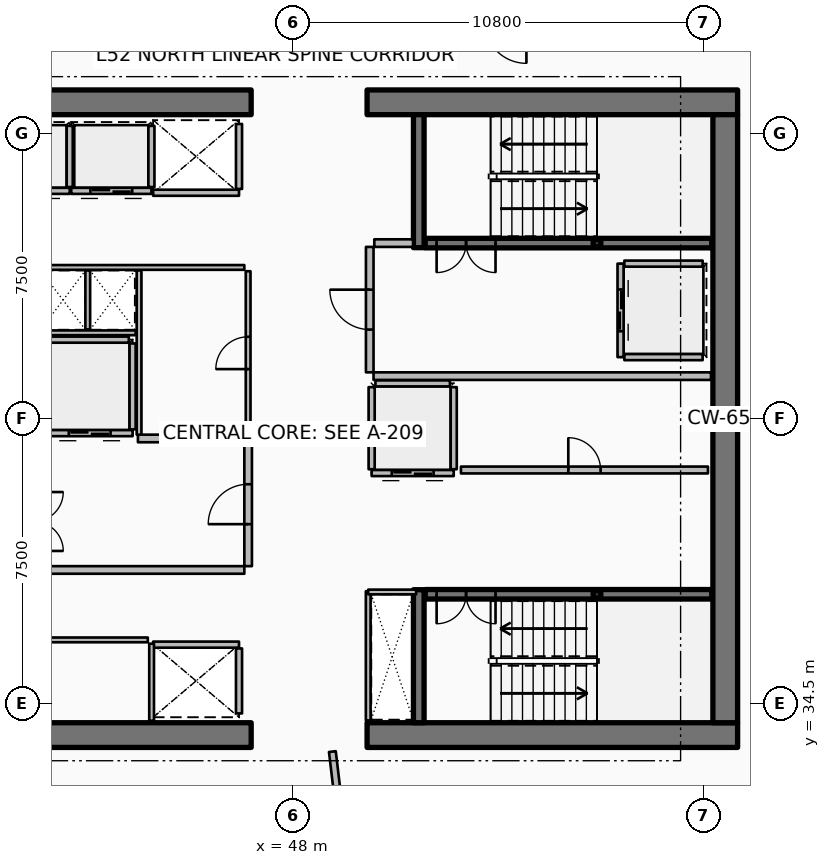
"""IFC4 building model, lengths in metres.
Left out: names, types, materials, properties, quantities, classifications, styles, units other than length and angle.
Written with IfcOpenShell. Run it as: python <this file> out.ifc"""

import sys

from ifc_helpers import new_model, si_unit, direction, frame, frame_2d, origin, origin_2d, place, context, subcontext, project, spatial, rectangle, hollow_rectangle, extrude, element, fill, save


model = new_model("IFC4")
c1 = context("Model", 3, precision=1e-05, world=origin(), true_north=direction((0.0, 1.0)))
c2 = subcontext(c1, "Body", "Model", "MODEL_VIEW")
j1 = project(units=[si_unit("LENGTHUNIT", "METRE"), si_unit("PLANEANGLEUNIT", "RADIAN")], contexts=[c1])
p1 = place(None, origin())
s1 = spatial("IfcSite", under=j1, at=p1, CompositionType="ELEMENT")
p2 = place(p1, origin())
s2 = spatial("IfcBuilding", under=s1, at=p2, CompositionType="ELEMENT")
p3 = place(p2, frame((0.0, 0.0, 206.55)))
s3 = spatial("IfcBuildingStorey", under=s2, at=p3, CompositionType="ELEMENT", Elevation=206.55)
for number, where, z_axis, x_axis in (
    (1, (37.15, 33.675, 0.0), (0.0, 0.0, 1.0), (1.0, 0.0, 0.0)),
    (2, (49.95, 33.675, 0.0), (0.0, 0.0, 1.0), (1.0, 0.0, 0.0)),
    (3, (37.15, 50.325, 0.0), (0.0, 0.0, 1.0), (1.0, 0.0, 0.0)),
    (4, (49.95, 50.325, 0.0), (0.0, 0.0, 1.0), (1.0, 0.0, 0.0)),
):
    element("IfcWall", number, at=place(p3, frame(where, z_axis=z_axis, x_axis=x_axis)), inside=s3, PredefinedType="SHEAR", context=c2, shape_type="SweptSolid", body=[
        extrude(rectangle(XDim=9.75, YDim=0.65, at=frame_2d((4.875, 0.0))), origin(), (0.0, 0.0, 1.0), 3.75),
    ])
p4 = place(p3, frame((59.375, 34.0, 0.0), z_axis=(0.0, 0.0, 1.0), x_axis=(0.0, 1.0, 0.0)))
e5 = element("IfcWall", 5, at=p4, inside=s3, PredefinedType="SHEAR", context=c2, shape_type="SweptSolid", body=[
    extrude(rectangle(XDim=16.0, YDim=0.65, at=frame_2d((8.0, 0.0))), origin(), (0.0, 0.0, 1.0), 3.75),
])
for number, where, z_axis, x_axis in (
    (6, (51.31, 46.5, 0.0), (0.0, 0.0, 1.0), (0.0, 1.0, 0.0)),
    (7, (51.31, 34.0, 0.0), (0.0, 0.0, 1.0), (0.0, 1.0, 0.0)),
):
    element("IfcWall", number, at=place(p3, frame(where, z_axis=z_axis, x_axis=x_axis)), inside=s3, PredefinedType="SHEAR", context=c2, shape_type="SweptSolid", body=[
        extrude(rectangle(XDim=3.5, YDim=0.28, at=frame_2d((1.75, 0.0))), origin(), (0.0, 0.0, 1.0), 3.75),
    ])
for number, where, z_axis, x_axis in (
    (8, (56.0, 46.62, 0.0), (0.0, 0.0, 1.0), (1.0, 0.0, 0.0)),
    (9, (56.0, 37.38, 0.0), (0.0, 0.0, 1.0), (1.0, 0.0, 0.0)),
):
    element("IfcColumn", number, at=place(p3, frame(where, z_axis=z_axis, x_axis=x_axis)), inside=s3, PredefinedType="COLUMN", context=c2, shape_type="SweptSolid", body=[
        extrude(hollow_rectangle(XDim=0.2, YDim=0.2, WallThickness=0.01, InnerFilletRadius=0.01, OuterFilletRadius=0.02, at=origin_2d()), origin(), (0.0, 0.0, 1.0), 1.67),
    ])
p5 = place(p3, frame((51.48, 46.62, 0.0), z_axis=(0.0, 0.0, 1.0), x_axis=(1.0, 0.0, 0.0)))
e10 = element("IfcWall", 10, at=p5, inside=s3, PredefinedType="SOLIDWALL", context=c2, shape_type="SweptSolid", body=[
    extrude(rectangle(XDim=7.54, YDim=0.25, at=frame_2d((3.77, 0.0))), origin(), (0.0, 0.0, 1.0), 3.5),
])
p6 = place(p5, frame((0.3, 0.0, 0.0)))
e11 = element("IfcOpeningElement", 11, at=p6, cuts=e10, PredefinedType="OPENING", context=c2, shape_type="SweptSolid", body=[
    extrude(rectangle(XDim=1.55, YDim=2.15, at=frame_2d((0.775, 1.075))), frame((0.0, 0.135, 0.0), z_axis=(0.0, -1.0, 0.0), x_axis=(1.0, 0.0, 0.0)), (0.0, 0.0, 1.0), 0.27),
])
p7 = place(p3, frame((51.48, 37.38, 0.0), z_axis=(0.0, 0.0, 1.0), x_axis=(1.0, 0.0, 0.0)))
e12 = element("IfcWall", 12, at=p7, inside=s3, PredefinedType="SOLIDWALL", context=c2, shape_type="SweptSolid", body=[
    extrude(rectangle(XDim=7.54, YDim=0.25, at=frame_2d((3.77, 0.0))), origin(), (0.0, 0.0, 1.0), 3.5),
])
p8 = place(p7, frame((0.3, 0.0, 0.0)))
e13 = element("IfcOpeningElement", 13, at=p8, cuts=e12, PredefinedType="OPENING", context=c2, shape_type="SweptSolid", body=[
    extrude(rectangle(XDim=1.55, YDim=2.15, at=frame_2d((0.775, 1.075))), frame((0.0, 0.135, 0.0), z_axis=(0.0, -1.0, 0.0), x_axis=(1.0, 0.0, 0.0)), (0.0, 0.0, 1.0), 0.27),
])
p9 = place(p3, frame((42.125, 47.995, 0.0), z_axis=(0.0, 0.0, 1.0), x_axis=(-1.0, 0.0, 0.0)))
e14 = element("IfcWall", 14, at=p9, inside=s3, PredefinedType="PARTITIONING", context=c2, shape_type="SweptSolid", body=[
    extrude(rectangle(XDim=2.11, YDim=0.16, at=frame_2d((1.055, 0.0))), origin(), (0.0, 0.0, 1.0), 3.5),
])
p10 = place(p9, frame((0.505, 0.0, 0.0)))
e15 = element("IfcOpeningElement", 15, at=p10, cuts=e14, PredefinedType="OPENING", context=c2, shape_type="SweptSolid", body=[
    extrude(rectangle(XDim=1.1, YDim=2.1, at=frame_2d((0.55, 1.05))), frame((0.0, 0.09, 0.0), z_axis=(0.0, -1.0, 0.0), x_axis=(1.0, 0.0, 0.0)), (0.0, 0.0, 1.0), 0.18),
])
p11 = place(p3, frame((42.125, 48.095, 0.0), z_axis=(0.0, 0.0, 1.0), x_axis=(0.0, 1.0, 0.0)))
e16 = element("IfcWall", 16, at=p11, inside=s3, PredefinedType="PARTITIONING", context=c2, shape_type="SweptSolid", body=[
    extrude(rectangle(XDim=1.61, YDim=0.16, at=frame_2d((0.805, 0.0))), origin(), (0.0, 0.0, 1.0), 3.5),
])
p12 = place(p3, frame((44.275, 47.995, 0.0), z_axis=(0.0, 0.0, 1.0), x_axis=(-1.0, 0.0, 0.0)))
e17 = element("IfcWall", 17, at=p12, inside=s3, PredefinedType="PARTITIONING", context=c2, shape_type="SweptSolid", body=[
    extrude(rectangle(XDim=2.11, YDim=0.16, at=frame_2d((1.055, 0.0))), origin(), (0.0, 0.0, 1.0), 3.5),
])
p13 = place(p12, frame((0.505, 0.0, 0.0)))
e18 = element("IfcOpeningElement", 18, at=p13, cuts=e17, PredefinedType="OPENING", context=c2, shape_type="SweptSolid", body=[
    extrude(rectangle(XDim=1.1, YDim=2.1, at=frame_2d((0.55, 1.05))), frame((0.0, 0.09, 0.0), z_axis=(0.0, -1.0, 0.0), x_axis=(1.0, 0.0, 0.0)), (0.0, 0.0, 1.0), 0.18),
])
p14 = place(p3, frame((44.275, 48.095, 0.0), z_axis=(0.0, 0.0, 1.0), x_axis=(0.0, 1.0, 0.0)))
e19 = element("IfcWall", 19, at=p14, inside=s3, PredefinedType="PARTITIONING", context=c2, shape_type="SweptSolid", body=[
    extrude(rectangle(XDim=1.61, YDim=0.16, at=frame_2d((0.805, 0.0))), origin(), (0.0, 0.0, 1.0), 3.5),
])
p15 = place(p3, frame((46.58, 47.945, 0.0), z_axis=(0.0, 0.0, 1.0), x_axis=(-1.0, 0.0, 0.0)))
e20 = element("IfcWall", 20, at=p15, inside=s3, PredefinedType="PARTITIONING", context=c2, shape_type="SweptSolid", body=[
    extrude(rectangle(XDim=2.26, YDim=0.16, at=frame_2d((1.13, 0.0))), origin(), (0.0, 0.0, 1.0), 3.5),
])
p16 = place(p3, frame((46.58, 48.045, 0.0), z_axis=(0.0, 0.0, 1.0), x_axis=(0.0, 1.0, 0.0)))
e21 = element("IfcWall", 21, at=p16, inside=s3, PredefinedType="PARTITIONING", context=c2, shape_type="SweptSolid", body=[
    extrude(rectangle(XDim=1.71, YDim=0.16, at=frame_2d((0.855, 0.0))), origin(), (0.0, 0.0, 1.0), 3.5),
])
p17 = place(p3, frame((44.32, 36.055, 0.0), z_axis=(0.0, 0.0, 1.0), x_axis=(1.0, 0.0, 0.0)))
e22 = element("IfcWall", 22, at=p17, inside=s3, PredefinedType="PARTITIONING", context=c2, shape_type="SweptSolid", body=[
    extrude(rectangle(XDim=2.26, YDim=0.16, at=frame_2d((1.13, 0.0))), origin(), (0.0, 0.0, 1.0), 3.5),
])
p18 = place(p3, frame((46.58, 34.245, 0.0), z_axis=(0.0, 0.0, 1.0), x_axis=(0.0, 1.0, 0.0)))
e23 = element("IfcWall", 23, at=p18, inside=s3, PredefinedType="PARTITIONING", context=c2, shape_type="SweptSolid", body=[
    extrude(rectangle(XDim=1.71, YDim=0.16, at=frame_2d((0.855, 0.0))), origin(), (0.0, 0.0, 1.0), 3.5),
])
p19 = place(p3, frame((43.78, 41.62, 0.0), z_axis=(0.0, 0.0, 1.0), x_axis=(-1.0, 0.0, 0.0)))
e24 = element("IfcWall", 24, at=p19, inside=s3, PredefinedType="PARTITIONING", context=c2, shape_type="SweptSolid", body=[
    extrude(rectangle(XDim=2.26, YDim=0.16, at=frame_2d((1.13, 0.0))), origin(), (0.0, 0.0, 1.0), 3.5),
])
p20 = place(p19, frame((0.58, 0.0, 0.0)))
e25 = element("IfcOpeningElement", 25, at=p20, cuts=e24, PredefinedType="OPENING", context=c2, shape_type="SweptSolid", body=[
    extrude(rectangle(XDim=1.1, YDim=2.1, at=frame_2d((0.55, 1.05))), frame((0.0, 0.09, 0.0), z_axis=(0.0, -1.0, 0.0), x_axis=(1.0, 0.0, 0.0)), (0.0, 0.0, 1.0), 0.18),
])
p21 = place(p3, frame((43.78, 41.72, 0.0), z_axis=(0.0, 0.0, 1.0), x_axis=(0.0, 1.0, 0.0)))
e26 = element("IfcWall", 26, at=p21, inside=s3, PredefinedType="PARTITIONING", context=c2, shape_type="SweptSolid", body=[
    extrude(rectangle(XDim=2.26, YDim=0.16, at=frame_2d((1.13, 0.0))), origin(), (0.0, 0.0, 1.0), 3.5),
])
p22 = place(p3, frame((41.62, 44.08, 0.0), z_axis=(0.0, 0.0, 1.0), x_axis=(1.0, 0.0, 0.0)))
e27 = element("IfcWall", 27, at=p22, inside=s3, PredefinedType="PARTITIONING", context=c2, shape_type="SweptSolid", body=[
    extrude(rectangle(XDim=2.06, YDim=0.16, at=frame_2d((1.03, 0.0))), origin(), (0.0, 0.0, 1.0), 3.5),
])
p23 = place(p3, frame((56.62, 46.08, 0.0), z_axis=(0.0, 0.0, 1.0), x_axis=(0.0, -1.0, 0.0)))
e28 = element("IfcWall", 28, at=p23, inside=s3, PredefinedType="PARTITIONING", context=c2, shape_type="SweptSolid", body=[
    extrude(rectangle(XDim=2.46, YDim=0.16, at=frame_2d((1.23, 0.0))), origin(), (0.0, 0.0, 1.0), 3.5),
])
p24 = place(p23, frame((0.68, 0.0, 0.0)))
e29 = element("IfcOpeningElement", 29, at=p24, cuts=e28, PredefinedType="OPENING", context=c2, shape_type="SweptSolid", body=[
    extrude(rectangle(XDim=1.1, YDim=2.1, at=frame_2d((0.55, 1.05))), frame((0.0, 0.09, 0.0), z_axis=(0.0, -1.0, 0.0), x_axis=(1.0, 0.0, 0.0)), (0.0, 0.0, 1.0), 0.18),
])
for number, where, z_axis, x_axis in (
    (30, (56.72, 46.08, 0.0), (0.0, 0.0, 1.0), (1.0, 0.0, 0.0)),
    (31, (56.72, 43.62, 0.0), (0.0, 0.0, 1.0), (1.0, 0.0, 0.0)),
):
    element("IfcWall", number, at=place(p3, frame(where, z_axis=z_axis, x_axis=x_axis)), inside=s3, PredefinedType="PARTITIONING", context=c2, shape_type="SweptSolid", body=[
        extrude(rectangle(XDim=2.06, YDim=0.16, at=frame_2d((1.03, 0.0))), origin(), (0.0, 0.0, 1.0), 3.5),
    ])
p25 = place(p3, frame((52.23, 40.57, 0.0), z_axis=(0.0, 0.0, 1.0), x_axis=(-1.0, 0.0, 0.0)))
e32 = element("IfcWall", 32, at=p25, inside=s3, PredefinedType="PARTITIONING", context=c2, shape_type="SweptSolid", body=[
    extrude(rectangle(XDim=2.16, YDim=0.16, at=frame_2d((1.08, 0.0))), origin(), (0.0, 0.0, 1.0), 3.5),
])
p26 = place(p25, frame((0.53, 0.0, 0.0)))
e33 = element("IfcOpeningElement", 33, at=p26, cuts=e32, PredefinedType="OPENING", context=c2, shape_type="SweptSolid", body=[
    extrude(rectangle(XDim=1.1, YDim=2.1, at=frame_2d((0.55, 1.05))), frame((0.0, 0.09, 0.0), z_axis=(0.0, -1.0, 0.0), x_axis=(1.0, 0.0, 0.0)), (0.0, 0.0, 1.0), 0.18),
])
for number, where, z_axis, x_axis in (
    (34, (52.23, 40.67, 0.0), (0.0, 0.0, 1.0), (0.0, 1.0, 0.0)),
    (35, (50.07, 40.67, 0.0), (0.0, 0.0, 1.0), (0.0, 1.0, 0.0)),
):
    element("IfcWall", number, at=place(p3, frame(where, z_axis=z_axis, x_axis=x_axis)), inside=s3, PredefinedType="PARTITIONING", context=c2, shape_type="SweptSolid", body=[
        extrude(rectangle(XDim=2.16, YDim=0.16, at=frame_2d((1.08, 0.0))), origin(), (0.0, 0.0, 1.0), 3.5),
    ])
p27 = place(p3, frame((50.17, 42.93, 0.0), z_axis=(0.0, 0.0, 1.0), x_axis=(1.0, 0.0, 0.0)))
e36 = element("IfcWall", 36, at=p27, inside=s3, PredefinedType="PARTITIONING", context=c2, shape_type="SweptSolid", body=[
    extrude(rectangle(XDim=1.96, YDim=0.16, at=frame_2d((0.98, 0.0))), origin(), (0.0, 0.0, 1.0), 3.5),
])
p28 = place(p3, frame((52.42, 40.65, 0.0), z_axis=(0.0, 0.0, 1.0), x_axis=(1.0, 0.0, 0.0)))
e37 = element("IfcWall", 37, at=p28, inside=s3, PredefinedType="PARTITIONING", context=c2, shape_type="SweptSolid", body=[
    extrude(rectangle(XDim=6.5, YDim=0.18, at=frame_2d((3.25, 0.0))), origin(), (0.0, 0.0, 1.0), 3.5),
])
p29 = place(p28, frame((2.825, 0.0, 0.0)))
e38 = element("IfcOpeningElement", 38, at=p29, cuts=e37, PredefinedType="OPENING", context=c2, shape_type="SweptSolid", body=[
    extrude(rectangle(XDim=0.85, YDim=2.06, at=frame_2d((0.425, 1.03))), frame((0.0, 0.1, 0.0), z_axis=(0.0, -1.0, 0.0), x_axis=(1.0, 0.0, 0.0)), (0.0, 0.0, 1.0), 0.2),
])
p30 = place(p3, frame((44.28, 34.05, 0.0), z_axis=(0.0, 0.0, 1.0), x_axis=(0.0, 1.0, 0.0)))
e39 = element("IfcWall", 39, at=p30, inside=s3, PredefinedType="PARTITIONING", context=c2, shape_type="SweptSolid", body=[
    extrude(rectangle(XDim=2.03, YDim=0.125, at=frame_2d((1.015, 0.0))), origin(), (0.0, 0.0, 1.0), 2.94),
])
p31 = place(p3, frame((37.92, 36.18, 0.0), z_axis=(0.0, 0.0, 1.0), x_axis=(1.0, 0.0, 0.0)))
e40 = element("IfcWall", 40, at=p31, inside=s3, PredefinedType="PARTITIONING", context=c2, shape_type="SweptSolid", body=[
    extrude(rectangle(XDim=6.26, YDim=0.125, at=frame_2d((3.13, 0.0))), origin(), (0.0, 0.0, 1.0), 2.94),
])
p32 = place(p31, frame((2.705, 0.0, 0.0)))
e41 = element("IfcOpeningElement", 41, at=p32, cuts=e40, PredefinedType="OPENING", context=c2, shape_type="SweptSolid", body=[
    extrude(rectangle(XDim=0.85, YDim=2.06, at=frame_2d((0.425, 1.03))), frame((0.0, 0.073, 0.0), z_axis=(0.0, -1.0, 0.0), x_axis=(1.0, 0.0, 0.0)), (0.0, 0.0, 1.0), 0.145),
])
p33 = place(p3, frame((41.35, 38.02, 0.0), z_axis=(0.0, 0.0, 1.0), x_axis=(1.0, 0.0, 0.0)))
e42 = element("IfcWall", 42, at=p33, inside=s3, PredefinedType="PARTITIONING", context=c2, shape_type="SweptSolid", body=[
    extrude(rectangle(XDim=5.37, YDim=0.2, at=frame_2d((2.685, 0.0))), origin(), (0.0, 0.0, 1.0), 3.5),
])
p34 = place(p3, frame((43.92, 41.48, 0.0), z_axis=(0.0, 0.0, 1.0), x_axis=(1.0, 0.0, 0.0)))
e43 = element("IfcWall", 43, at=p34, inside=s3, PredefinedType="PARTITIONING", context=c2, shape_type="SweptSolid", body=[
    extrude(rectangle(XDim=2.8, YDim=0.2, at=frame_2d((1.4, 0.0))), origin(), (0.0, 0.0, 1.0), 3.5),
])
p35 = place(p3, frame((46.82, 38.12, 0.0), z_axis=(0.0, 0.0, 1.0), x_axis=(0.0, 1.0, 0.0)))
e44 = element("IfcWall", 44, at=p35, inside=s3, PredefinedType="PARTITIONING", context=c2, shape_type="SweptSolid", body=[
    extrude(rectangle(XDim=3.26, YDim=0.2, at=frame_2d((1.63, 0.0))), origin(), (0.0, 0.0, 1.0), 3.5),
])
p36 = place(p35, frame((1.105, 0.0, 0.0)))
e45 = element("IfcOpeningElement", 45, at=p36, cuts=e44, PredefinedType="OPENING", context=c2, shape_type="SweptSolid", body=[
    extrude(rectangle(XDim=1.05, YDim=2.1, at=frame_2d((0.525, 1.05))), frame((0.0, 0.11, 0.0), z_axis=(0.0, -1.0, 0.0), x_axis=(1.0, 0.0, 0.0)), (0.0, 0.0, 1.0), 0.22),
])
p37 = place(p3, frame((50.12, 43.12, 0.0), z_axis=(0.0, 0.0, 1.0), x_axis=(1.0, 0.0, 0.0)))
e46 = element("IfcWall", 46, at=p37, inside=s3, PredefinedType="PARTITIONING", context=c2, shape_type="SweptSolid", body=[
    extrude(rectangle(XDim=8.88, YDim=0.2, at=frame_2d((4.44, 0.0))), origin(), (0.0, 0.0, 1.0), 3.5),
])
p38 = place(p3, frame((50.14, 46.62, 0.0), z_axis=(0.0, 0.0, 1.0), x_axis=(1.0, 0.0, 0.0)))
e47 = element("IfcWall", 47, at=p38, inside=s3, PredefinedType="PARTITIONING", context=c2, shape_type="SweptSolid", body=[
    extrude(rectangle(XDim=1.02, YDim=0.2, at=frame_2d((0.51, 0.0))), origin(), (0.0, 0.0, 1.0), 3.5),
])
p39 = place(p3, frame((50.02, 43.22, 0.0), z_axis=(0.0, 0.0, 1.0), x_axis=(0.0, 1.0, 0.0)))
e48 = element("IfcWall", 48, at=p39, inside=s3, PredefinedType="PARTITIONING", context=c2, shape_type="SweptSolid", body=[
    extrude(rectangle(XDim=3.3, YDim=0.2, at=frame_2d((1.65, 0.0))), origin(), (0.0, 0.0, 1.0), 3.5),
])
p40 = place(p39, frame((1.125, 0.0, 0.0)))
e49 = element("IfcOpeningElement", 49, at=p40, cuts=e48, PredefinedType="OPENING", context=c2, shape_type="SweptSolid", body=[
    extrude(rectangle(XDim=1.05, YDim=2.1, at=frame_2d((0.525, 1.05))), frame((0.0, 0.11, 0.0), z_axis=(0.0, -1.0, 0.0), x_axis=(1.0, 0.0, 0.0)), (0.0, 0.0, 1.0), 0.22),
])
p41 = place(p3, frame((41.36, 45.98, 0.0), z_axis=(0.0, 0.0, 1.0), x_axis=(1.0, 0.0, 0.0)))
e50 = element("IfcWall", 50, at=p41, inside=s3, PredefinedType="PARTITIONING", context=c2, shape_type="SweptSolid", body=[
    extrude(rectangle(XDim=5.36, YDim=0.125, at=frame_2d((2.68, 0.0))), origin(), (0.0, 0.0, 1.0), 2.94),
])
p42 = place(p3, frame((41.36, 44.26, 0.0), z_axis=(0.0, 0.0, 1.0), x_axis=(1.0, 0.0, 0.0)))
e51 = element("IfcWall", 51, at=p42, inside=s3, PredefinedType="PARTITIONING", context=c2, shape_type="SweptSolid", body=[
    extrude(rectangle(XDim=2.5, YDim=0.125, at=frame_2d((1.25, 0.0))), origin(), (0.0, 0.0, 1.0), 2.94),
])
p43 = place(p3, frame((42.6, 44.35, 0.0), z_axis=(0.0, 0.0, 1.0), x_axis=(0.0, 1.0, 0.0)))
e52 = element("IfcWall", 52, at=p43, inside=s3, PredefinedType="PARTITIONING", context=c2, shape_type="SweptSolid", body=[
    extrude(rectangle(XDim=1.55, YDim=0.125, at=frame_2d((0.775, 0.0))), origin(), (0.0, 0.0, 1.0), 2.94),
])
p44 = place(p3, frame((49.98, 34.06, 0.0), z_axis=(0.0, 0.0, 1.0), x_axis=(0.0, 1.0, 0.0)))
e53 = element("IfcWall", 53, at=p44, inside=s3, PredefinedType="PARTITIONING", context=c2, shape_type="SweptSolid", body=[
    extrude(rectangle(XDim=3.4, YDim=0.125, at=frame_2d((1.7, 0.0))), origin(), (0.0, 0.0, 1.0), 2.94),
])
p45 = place(p3, frame((49.98, 37.44, 0.0), z_axis=(0.0, 0.0, 1.0), x_axis=(1.0, 0.0, 0.0)))
e54 = element("IfcWall", 54, at=p45, inside=s3, PredefinedType="PARTITIONING", context=c2, shape_type="SweptSolid", body=[
    extrude(rectangle(XDim=1.26, YDim=0.125, at=frame_2d((0.63, 0.0))), origin(), (0.0, 0.0, 1.0), 2.94),
])
p46 = place(p3, frame((43.95, 41.58, 0.0), z_axis=(0.0, 0.0, 1.0), x_axis=(0.0, 1.0, 0.0)))
e55 = element("IfcWall", 55, at=p46, inside=s3, PredefinedType="PARTITIONING", context=c2, shape_type="SweptSolid", body=[
    extrude(rectangle(XDim=4.32, YDim=0.125, at=frame_2d((2.16, 0.0))), origin(), (0.0, 0.0, 1.0), 2.94),
])
p47 = place(p3, frame((46.82, 41.58, 0.0), z_axis=(0.0, 0.0, 1.0), x_axis=(0.0, 1.0, 0.0)))
e56 = element("IfcWall", 56, at=p47, inside=s3, PredefinedType="PARTITIONING", context=c2, shape_type="SweptSolid", body=[
    extrude(rectangle(XDim=4.3, YDim=0.125, at=frame_2d((2.15, 0.0))), origin(), (0.0, 0.0, 1.0), 2.94),
])
p48 = place(p47, frame((1.725, 0.0, 0.0)))
e57 = element("IfcOpeningElement", 57, at=p48, cuts=e56, PredefinedType="OPENING", context=c2, shape_type="SweptSolid", body=[
    extrude(rectangle(XDim=0.85, YDim=2.06, at=frame_2d((0.425, 1.03))), frame((0.0, 0.073, 0.0), z_axis=(0.0, -1.0, 0.0), x_axis=(1.0, 0.0, 0.0)), (0.0, 0.0, 1.0), 0.145),
])
p49 = place(p3, frame((49.037, 33.241, 0.0), z_axis=(0.0, 0.0, 1.0), x_axis=(0.11753742895, -0.993068453228, 0.0)))
e58 = element("IfcWall", 58, at=p49, inside=s3, PredefinedType="PARTITIONING", context=c2, shape_type="SweptSolid", body=[
    extrude(rectangle(XDim=13.815, YDim=0.18, at=frame_2d((6.907, 0.0))), origin(), (0.0, 0.0, 1.0), 2.94),
])
p50 = place(p6, origin())
e59 = element("IfcDoor", 59, at=p50, inside=s3, OperationType="DOUBLE_DOOR_SINGLE_SWING", PredefinedType="DOOR", context=c2, shape_type="SweptSolid", body=[
    extrude(rectangle(XDim=1.55, YDim=2.15, at=frame_2d((0.775, 1.075))), frame((0.0, 0.025, 0.0), z_axis=(0.0, -1.0, 0.0), x_axis=(1.0, 0.0, 0.0)), (0.0, 0.0, 1.0), 0.05),
])
fill(e11, e59)
p51 = place(p8, origin())
e60 = element("IfcDoor", 60, at=p51, inside=s3, OperationType="DOUBLE_DOOR_SINGLE_SWING", PredefinedType="DOOR", context=c2, shape_type="SweptSolid", body=[
    extrude(rectangle(XDim=1.55, YDim=2.15, at=frame_2d((0.775, 1.075))), frame((0.0, 0.025, 0.0), z_axis=(0.0, -1.0, 0.0), x_axis=(1.0, 0.0, 0.0)), (0.0, 0.0, 1.0), 0.05),
])
fill(e13, e60)
p52 = place(p13, origin())
e61 = element("IfcDoor", 61, at=p52, inside=s3, OperationType="DOUBLE_DOOR_SLIDING", PredefinedType="DOOR", context=c2, shape_type="SweptSolid", body=[
    extrude(rectangle(XDim=1.1, YDim=2.1, at=frame_2d((0.55, 1.05))), frame((0.0, 0.025, 0.0), z_axis=(0.0, -1.0, 0.0), x_axis=(1.0, 0.0, 0.0)), (0.0, 0.0, 1.0), 0.05),
])
fill(e18, e61)
p53 = place(p20, origin())
e62 = element("IfcDoor", 62, at=p53, inside=s3, OperationType="DOUBLE_DOOR_SLIDING", PredefinedType="DOOR", context=c2, shape_type="SweptSolid", body=[
    extrude(rectangle(XDim=1.1, YDim=2.1, at=frame_2d((0.55, 1.05))), frame((0.0, 0.025, 0.0), z_axis=(0.0, -1.0, 0.0), x_axis=(1.0, 0.0, 0.0)), (0.0, 0.0, 1.0), 0.05),
])
fill(e25, e62)
p54 = place(p24, origin())
e63 = element("IfcDoor", 63, at=p54, inside=s3, OperationType="DOUBLE_DOOR_SLIDING", PredefinedType="DOOR", context=c2, shape_type="SweptSolid", body=[
    extrude(rectangle(XDim=1.1, YDim=2.1, at=frame_2d((0.55, 1.05))), frame((0.0, 0.025, 0.0), z_axis=(0.0, -1.0, 0.0), x_axis=(1.0, 0.0, 0.0)), (0.0, 0.0, 1.0), 0.05),
])
fill(e29, e63)
p55 = place(p26, origin())
e64 = element("IfcDoor", 64, at=p55, inside=s3, OperationType="DOUBLE_DOOR_SLIDING", PredefinedType="DOOR", context=c2, shape_type="SweptSolid", body=[
    extrude(rectangle(XDim=1.1, YDim=2.1, at=frame_2d((0.55, 1.05))), frame((0.0, 0.025, 0.0), z_axis=(0.0, -1.0, 0.0), x_axis=(1.0, 0.0, 0.0)), (0.0, 0.0, 1.0), 0.05),
])
fill(e33, e64)
p56 = place(p29, origin())
e65 = element("IfcDoor", 65, at=p56, inside=s3, OperationType="SINGLE_SWING_LEFT", PredefinedType="DOOR", context=c2, shape_type="SweptSolid", body=[
    extrude(rectangle(XDim=0.85, YDim=2.06, at=frame_2d((0.425, 1.03))), frame((0.0, 0.025, 0.0), z_axis=(0.0, -1.0, 0.0), x_axis=(1.0, 0.0, 0.0)), (0.0, 0.0, 1.0), 0.05),
])
fill(e38, e65)
p57 = place(p36, origin())
e66 = element("IfcDoor", 66, at=p57, inside=s3, OperationType="SINGLE_SWING_LEFT", PredefinedType="DOOR", context=c2, shape_type="SweptSolid", body=[
    extrude(rectangle(XDim=1.05, YDim=2.1, at=frame_2d((0.525, 1.05))), frame((0.0, 0.025, 0.0), z_axis=(0.0, -1.0, 0.0), x_axis=(1.0, 0.0, 0.0)), (0.0, 0.0, 1.0), 0.05),
])
fill(e45, e66)
p58 = place(p40, origin())
e67 = element("IfcDoor", 67, at=p58, inside=s3, OperationType="SINGLE_SWING_RIGHT", PredefinedType="DOOR", context=c2, shape_type="SweptSolid", body=[
    extrude(rectangle(XDim=1.05, YDim=2.1, at=frame_2d((0.525, 1.05))), frame((0.0, 0.025, 0.0), z_axis=(0.0, -1.0, 0.0), x_axis=(1.0, 0.0, 0.0)), (0.0, 0.0, 1.0), 0.05),
])
fill(e49, e67)
p59 = place(p48, origin())
e68 = element("IfcDoor", 68, at=p59, inside=s3, OperationType="SINGLE_SWING_LEFT", PredefinedType="DOOR", context=c2, shape_type="SweptSolid", body=[
    extrude(rectangle(XDim=0.85, YDim=2.06, at=frame_2d((0.425, 1.03))), frame((0.0, 0.025, 0.0), z_axis=(0.0, -1.0, 0.0), x_axis=(1.0, 0.0, 0.0)), (0.0, 0.0, 1.0), 0.05),
])
fill(e57, e68)
save(model, sys.argv[1])
